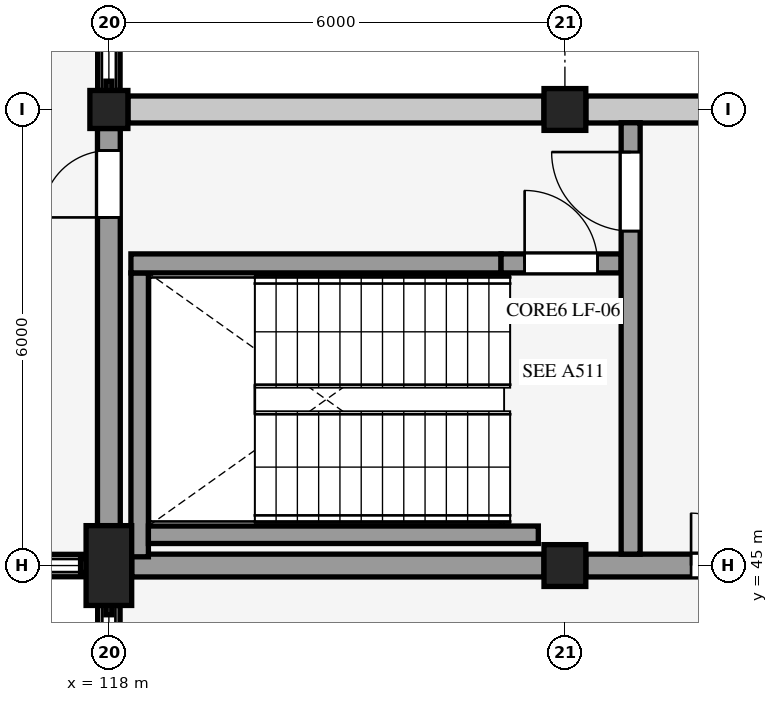
"""IFC4 building model, lengths in metres.
Left out: names, types, materials, properties, quantities, classifications, styles, units other than length and angle.
Written with IfcOpenShell. Run it as: python <this file> out.ifc"""

import sys

from ifc_helpers import new_model, si_unit, direction, frame, frame_2d, origin, origin_2d, place, context, subcontext, project, spatial, rectangle, extrude, element, fill, save


model = new_model("IFC4")
c1 = context("Model", 3, precision=1e-05, world=origin(), true_north=direction((0.0, 1.0)))
c2 = subcontext(c1, "Body", "Model", "MODEL_VIEW")
j1 = project(units=[si_unit("LENGTHUNIT", "METRE"), si_unit("PLANEANGLEUNIT", "RADIAN")], contexts=[c1])
p1 = place(None, origin())
s1 = spatial("IfcSite", under=j1, at=p1, CompositionType="ELEMENT")
p2 = place(p1, origin())
s2 = spatial("IfcBuilding", under=s1, at=p2, CompositionType="ELEMENT")
p3 = place(p2, frame((0.0, 0.0, 9.0)))
s3 = spatial("IfcBuildingStorey", under=s2, at=p3, CompositionType="ELEMENT", Elevation=9.0)
p4 = place(p3, frame((118.0, 45.0, 0.0), z_axis=(0.0, 0.0, 1.0), x_axis=(1.0, 0.0, 0.0)))
e1 = element("IfcColumn", 1, at=p4, inside=s3, PredefinedType="PILASTER", context=c2, shape_type="SweptSolid", body=[
    extrude(rectangle(XDim=0.6, YDim=1.05, at=origin_2d()), origin(), (0.0, 0.0, 1.0), 4.5),
])
p5 = place(p3, frame((118.0, 51.0, 0.0), z_axis=(0.0, 0.0, 1.0), x_axis=(1.0, 0.0, 0.0)))
e2 = element("IfcColumn", 2, at=p5, inside=s3, PredefinedType="COLUMN", context=c2, shape_type="SweptSolid", body=[
    extrude(rectangle(XDim=0.5, YDim=0.5, at=origin_2d()), origin(), (0.0, 0.0, 1.0), 4.5),
])
for number, where, z_axis, x_axis in (
    (3, (124.0, 45.0, 0.0), (0.0, 0.0, 1.0), (1.0, 0.0, 0.0)),
    (4, (124.0, 51.0, 0.0), (0.0, 0.0, 1.0), (1.0, 0.0, 0.0)),
):
    element("IfcColumn", number, at=place(p3, frame(where, z_axis=z_axis, x_axis=x_axis)), inside=s3, PredefinedType="COLUMN", context=c2, shape_type="SweptSolid", body=[
        extrude(rectangle(XDim=0.55, YDim=0.55, at=origin_2d()), origin(), (0.0, 0.0, 1.0), 4.5),
    ])
p6 = place(p3, frame((117.7, 45.0, 0.0), z_axis=(0.0, 0.0, 1.0), x_axis=(-1.0, 0.0, 0.0)))
e5 = element("IfcWall", 5, at=p6, inside=s3, PredefinedType="SOLIDWALL", context=c2, shape_type="SweptSolid", body=[
    extrude(rectangle(XDim=5.4, YDim=0.295, at=frame_2d((2.7, 0.0))), origin(), (0.0, 0.0, 1.0), 0.26),
])
p7 = place(p3, frame((118.0, 55.975, 0.0), z_axis=(0.0, 0.0, 1.0), x_axis=(0.0, -1.0, 0.0)))
e6 = element("IfcWall", 6, at=p7, inside=s3, PredefinedType="SOLIDWALL", context=c2, shape_type="SweptSolid", body=[
    extrude(rectangle(XDim=4.725, YDim=0.295, at=frame_2d((2.363, 0.0))), origin(), (0.0, 0.0, 1.0), 0.36),
])
p8 = place(p3, frame((118.0, 39.275, 0.0), z_axis=(0.0, 0.0, 1.0), x_axis=(0.0, 1.0, 0.0)))
e7 = element("IfcWall", 7, at=p8, inside=s3, PredefinedType="SOLIDWALL", context=c2, shape_type="SweptSolid", body=[
    extrude(rectangle(XDim=5.2, YDim=0.295, at=frame_2d((2.6, 0.0))), origin(), (0.0, 0.0, 1.0), 0.26),
])
p9 = place(p3, frame((118.25, 51.0, 0.0), z_axis=(0.0, 0.0, 1.0), x_axis=(1.0, 0.0, 0.0)))
e8 = element("IfcWall", 8, at=p9, inside=s3, PredefinedType="SOLIDWALL", context=c2, shape_type="SweptSolid", body=[
    extrude(rectangle(XDim=5.475, YDim=0.355, at=frame_2d((2.738, 0.0))), origin(), (0.0, 0.0, 1.0), 3.845),
])
p10 = place(p3, frame((124.275, 51.0, 0.0), z_axis=(0.0, 0.0, 1.0), x_axis=(1.0, 0.0, 0.0)))
e9 = element("IfcWall", 9, at=p10, inside=s3, PredefinedType="SOLIDWALL", context=c2, shape_type="SweptSolid", body=[
    extrude(rectangle(XDim=5.475, YDim=0.355, at=frame_2d((2.738, 0.0))), origin(), (0.0, 0.0, 1.0), 3.857),
])
p11 = place(p3, frame((118.3, 45.0, 0.0), z_axis=(0.0, 0.0, 1.0), x_axis=(1.0, 0.0, 0.0)))
e10 = element("IfcWall", 10, at=p11, inside=s3, PredefinedType="SHEAR", context=c2, shape_type="SweptSolid", body=[
    extrude(rectangle(XDim=5.425, YDim=0.3, at=frame_2d((2.712, 0.0))), origin(), (0.0, 0.0, 1.0), 4.264),
])
p12 = place(p3, frame((124.275, 45.0, 0.0), z_axis=(0.0, 0.0, 1.0), x_axis=(1.0, 0.0, 0.0)))
e11 = element("IfcWall", 11, at=p12, inside=s3, PredefinedType="SHEAR", context=c2, shape_type="SweptSolid", body=[
    extrude(rectangle(XDim=5.475, YDim=0.3, at=frame_2d((2.738, 0.0))), origin(), (0.0, 0.0, 1.0), 4.264),
])
p13 = place(p12, frame((1.385, 0.0, 0.0)))
e12 = element("IfcOpeningElement", 12, at=p13, cuts=e11, PredefinedType="OPENING", context=c2, shape_type="SweptSolid", body=[
    extrude(rectangle(XDim=1.38, YDim=2.16, at=frame_2d((0.69, 1.08))), frame((0.0, 0.16, 0.0), z_axis=(0.0, -1.0, 0.0), x_axis=(1.0, 0.0, 0.0)), (0.0, 0.0, 1.0), 0.32),
])
p14 = place(p3, frame((118.0, 45.525, 0.0), z_axis=(0.0, 0.0, 1.0), x_axis=(0.0, 1.0, 0.0)))
e13 = element("IfcWall", 13, at=p14, inside=s3, PredefinedType="SHEAR", context=c2, shape_type="SweptSolid", body=[
    extrude(rectangle(XDim=5.225, YDim=0.3, at=frame_2d((2.613, 0.0))), origin(), (0.0, 0.0, 1.0), 4.264),
])
p15 = place(p14, frame((4.055, 0.0, 0.0)))
e14 = element("IfcOpeningElement", 14, at=p15, cuts=e13, PredefinedType="OPENING", context=c2, shape_type="SweptSolid", body=[
    extrude(rectangle(XDim=0.88, YDim=2.08, at=frame_2d((0.44, 1.04))), frame((0.0, 0.16, 0.0), z_axis=(0.0, -1.0, 0.0), x_axis=(1.0, 0.0, 0.0)), (0.0, 0.0, 1.0), 0.32),
])
p16 = place(p3, frame((118.405, 45.115, 0.0), z_axis=(0.0, 0.0, 1.0), x_axis=(0.0, 1.0, 0.0)))
e15 = element("IfcWall", 15, at=p16, inside=s3, PredefinedType="SHEAR", context=c2, shape_type="SweptSolid", body=[
    extrude(rectangle(XDim=3.735, YDim=0.23, at=frame_2d((1.868, 0.0))), origin(), (0.0, 0.0, 1.0), 4.5),
])
p17 = place(p3, frame((118.52, 45.405, 0.0), z_axis=(0.0, 0.0, 1.0), x_axis=(1.0, 0.0, 0.0)))
e16 = element("IfcWall", 16, at=p17, inside=s3, PredefinedType="SHEAR", context=c2, shape_type="SweptSolid", body=[
    extrude(rectangle(XDim=5.13, YDim=0.23, at=frame_2d((2.565, 0.0))), origin(), (0.0, 0.0, 1.0), 4.5),
])
p18 = place(p3, frame((118.29, 48.975, 0.0), z_axis=(0.0, 0.0, 1.0), x_axis=(1.0, 0.0, 0.0)))
e17 = element("IfcWall", 17, at=p18, inside=s3, PredefinedType="SHEAR", context=c2, shape_type="SweptSolid", body=[
    extrude(rectangle(XDim=4.87, YDim=0.25, at=frame_2d((2.435, 0.0))), origin(), (0.0, 0.0, 1.0), 4.5),
])
p19 = place(p3, frame((123.16, 48.975, 0.0), z_axis=(0.0, 0.0, 1.0), x_axis=(1.0, 0.0, 0.0)))
e18 = element("IfcWall", 18, at=p19, inside=s3, PredefinedType="SHEAR", context=c2, shape_type="SweptSolid", body=[
    extrude(rectangle(XDim=1.58, YDim=0.25, at=frame_2d((0.79, 0.0))), origin(), (0.0, 0.0, 1.0), 4.264),
])
p20 = place(p19, frame((0.31, 0.0, 0.0)))
e19 = element("IfcOpeningElement", 19, at=p20, cuts=e18, PredefinedType="OPENING", context=c2, shape_type="SweptSolid", body=[
    extrude(rectangle(XDim=0.96, YDim=2.12, at=frame_2d((0.48, 1.06))), frame((0.0, 0.135, 0.0), z_axis=(0.0, -1.0, 0.0), x_axis=(1.0, 0.0, 0.0)), (0.0, 0.0, 1.0), 0.27),
])
p21 = place(p3, frame((124.865, 45.15, 0.0), z_axis=(0.0, 0.0, 1.0), x_axis=(0.0, 1.0, 0.0)))
e20 = element("IfcWall", 20, at=p21, inside=s3, PredefinedType="SHEAR", context=c2, shape_type="SweptSolid", body=[
    extrude(rectangle(XDim=5.675, YDim=0.25, at=frame_2d((2.837, 0.0))), origin(), (0.0, 0.0, 1.0), 4.264),
])
p22 = place(p21, frame((4.25, 0.0, 0.0)))
e21 = element("IfcOpeningElement", 21, at=p22, cuts=e20, PredefinedType="OPENING", context=c2, shape_type="SweptSolid", body=[
    extrude(rectangle(XDim=1.04, YDim=2.14, at=frame_2d((0.52, 1.07))), frame((0.0, 0.135, 0.0), z_axis=(0.0, -1.0, 0.0), x_axis=(1.0, 0.0, 0.0)), (0.0, 0.0, 1.0), 0.27),
])
p23 = place(p13, origin())
e22 = element("IfcDoor", 22, at=p23, inside=s3, OperationType="DOUBLE_DOOR_SINGLE_SWING", PredefinedType="DOOR", context=c2, shape_type="SweptSolid", body=[
    extrude(rectangle(XDim=1.38, YDim=2.16, at=frame_2d((0.69, 1.08))), frame((0.0, 0.025, 0.0), z_axis=(0.0, -1.0, 0.0), x_axis=(1.0, 0.0, 0.0)), (0.0, 0.0, 1.0), 0.05),
])
fill(e12, e22)
p24 = place(p15, origin())
e23 = element("IfcDoor", 23, at=p24, inside=s3, OperationType="SINGLE_SWING_LEFT", PredefinedType="DOOR", context=c2, shape_type="SweptSolid", body=[
    extrude(rectangle(XDim=0.88, YDim=2.08, at=frame_2d((0.44, 1.04))), frame((0.0, 0.025, 0.0), z_axis=(0.0, -1.0, 0.0), x_axis=(1.0, 0.0, 0.0)), (0.0, 0.0, 1.0), 0.05),
])
fill(e14, e23)
p25 = place(p20, origin())
e24 = element("IfcDoor", 24, at=p25, inside=s3, OperationType="SINGLE_SWING_LEFT", PredefinedType="DOOR", context=c2, shape_type="SweptSolid", body=[
    extrude(rectangle(XDim=0.96, YDim=2.12, at=frame_2d((0.48, 1.06))), frame((0.0, 0.025, 0.0), z_axis=(0.0, -1.0, 0.0), x_axis=(1.0, 0.0, 0.0)), (0.0, 0.0, 1.0), 0.05),
])
fill(e19, e24)
p26 = place(p22, origin())
e25 = element("IfcDoor", 25, at=p26, inside=s3, OperationType="SINGLE_SWING_RIGHT", PredefinedType="DOOR", context=c2, shape_type="SweptSolid", body=[
    extrude(rectangle(XDim=1.04, YDim=2.14, at=frame_2d((0.52, 1.07))), frame((0.0, 0.025, 0.0), z_axis=(0.0, -1.0, 0.0), x_axis=(1.0, 0.0, 0.0)), (0.0, 0.0, 1.0), 0.05),
])
fill(e21, e25)
save(model, sys.argv[1])
